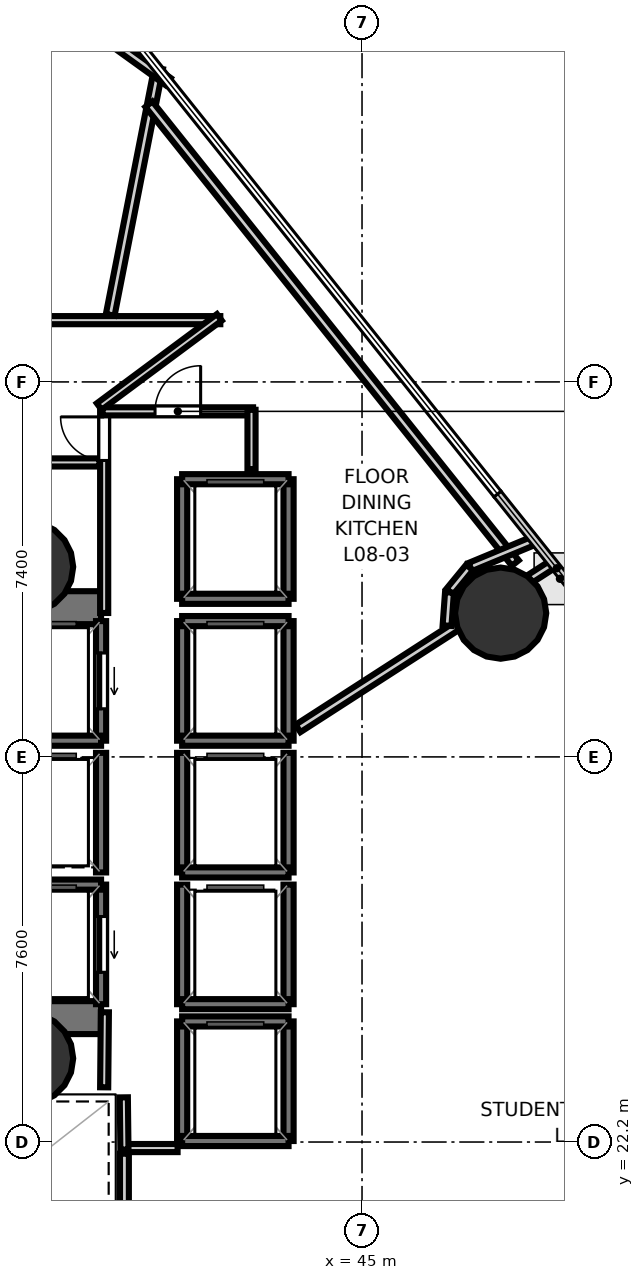
"""IFC4 building model, lengths in metres.
Left out: names, types, materials, properties, quantities, classifications, styles, units other than length and angle.
Written with IfcOpenShell. Run it as: python <this file> out.ifc"""

import sys

from ifc_helpers import new_model, si_unit, direction, frame, frame_2d, origin, origin_2d, place, context, subcontext, project, spatial, rectangle, hollow_circle, extrude, element, fill, save


model = new_model("IFC4")
c1 = context("Model", 3, precision=1e-05, world=origin(), true_north=direction((0.0, 1.0)))
c2 = subcontext(c1, "Body", "Model", "MODEL_VIEW")
j1 = project(units=[si_unit("LENGTHUNIT", "METRE"), si_unit("PLANEANGLEUNIT", "RADIAN")], contexts=[c1])
p1 = place(None, origin())
s1 = spatial("IfcSite", under=j1, at=p1, CompositionType="ELEMENT")
p2 = place(p1, origin())
s2 = spatial("IfcBuilding", under=s1, at=p2, CompositionType="ELEMENT")
p3 = place(p2, frame((0.0, 0.0, 36.8)))
s3 = spatial("IfcBuildingStorey", under=s2, at=p3, CompositionType="ELEMENT", Elevation=36.8)
p4 = place(p3, frame((29.13, 32.745, 0.0), z_axis=(0.0, 0.0, 1.0), x_axis=(1.0, 0.0, 0.0)))
e1 = element("IfcWall", 1, at=p4, inside=s3, PredefinedType="SHEAR", context=c2, shape_type="SweptSolid", body=[
    extrude(rectangle(XDim=10.72, YDim=0.65, at=frame_2d((5.36, 0.0))), origin(), (0.0, 0.0, 1.0), 3.52),
])
p5 = place(p4, frame((1.095, 0.0, 0.0)))
e2 = element("IfcOpeningElement", 2, at=p5, cuts=e1, PredefinedType="OPENING", context=c2, shape_type="SweptSolid", body=[
    extrude(rectangle(XDim=1.25, YDim=2.15, at=frame_2d((0.625, 1.075))), frame((0.0, 0.335, 0.0), z_axis=(0.0, -1.0, 0.0), x_axis=(1.0, 0.0, 0.0)), (0.0, 0.0, 1.0), 0.67),
])
p6 = place(p3, frame((29.13, 24.655, 0.0), z_axis=(0.0, 0.0, 1.0), x_axis=(1.0, 0.0, 0.0)))
e3 = element("IfcWall", 3, at=p6, inside=s3, PredefinedType="SHEAR", context=c2, shape_type="SweptSolid", body=[
    extrude(rectangle(XDim=10.72, YDim=0.65, at=frame_2d((5.36, 0.0))), origin(), (0.0, 0.0, 1.0), 3.52),
])
p7 = place(p6, frame((0.895, 0.0, 0.0)))
e4 = element("IfcOpeningElement", 4, at=p7, cuts=e3, PredefinedType="OPENING", context=c2, shape_type="SweptSolid", body=[
    extrude(rectangle(XDim=1.25, YDim=2.15, at=frame_2d((0.625, 1.075))), frame((0.0, 0.335, 0.0), z_axis=(0.0, -1.0, 0.0), x_axis=(1.0, 0.0, 0.0)), (0.0, 0.0, 1.0), 0.67),
])
for number, where, z_axis, x_axis in (
    (5, (38.4, 33.55, 0.0), (0.0, 0.0, 1.0), (1.0, 0.0, 0.0)),
    (6, (38.4, 23.85, 0.0), (0.0, 0.0, 1.0), (1.0, 0.0, 0.0)),
    (7, (47.736, 32.637, 0.0), (0.0, 0.0, 1.0), (1.0, 0.0, 0.0)),
):
    element("IfcColumn", number, at=place(p3, frame(where, z_axis=z_axis, x_axis=x_axis)), inside=s3, PredefinedType="COLUMN", context=c2, shape_type="SweptSolid", body=[
        extrude(hollow_circle(Radius=0.9, WallThickness=0.045, at=origin_2d()), origin(), (0.0, 0.0, 1.0), 3.7),
    ])
p8 = place(p3, frame((40.147, 44.413, 0.0), z_axis=(0.0, 0.0, 1.0), x_axis=(-0.997124396063, -0.07578217981, 0.0)))
e8 = element("IfcWall", 8, at=p8, inside=s3, PredefinedType="SOLIDWALL", context=c2, shape_type="SweptSolid", body=[
    extrude(rectangle(XDim=13.457, YDim=0.28, at=frame_2d((6.728, 0.0))), origin(), (0.0, 0.0, 1.0), 3.52),
])
p9 = place(p8, frame((3.137, 0.0, 0.85)))
e9 = element("IfcOpeningElement", 9, at=p9, cuts=e8, PredefinedType="OPENING", context=c2, shape_type="SweptSolid", body=[
    extrude(rectangle(XDim=1.8, YDim=2.1, at=frame_2d((0.9, 1.05))), frame((0.0, 0.15, 0.0), z_axis=(0.0, -1.0, 0.0), x_axis=(1.0, 0.0, 0.0)), (0.0, 0.0, 1.0), 0.3),
])
p10 = place(p8, frame((7.56, 0.0, 0.85)))
e10 = element("IfcOpeningElement", 10, at=p10, cuts=e8, PredefinedType="OPENING", context=c2, shape_type="SweptSolid", body=[
    extrude(rectangle(XDim=1.8, YDim=2.1, at=frame_2d((0.9, 1.05))), frame((0.0, 0.15, 0.0), z_axis=(0.0, -1.0, 0.0), x_axis=(1.0, 0.0, 0.0)), (0.0, 0.0, 1.0), 0.3),
])
p11 = place(p3, frame((39.85, 30.12, 0.0), z_axis=(0.0, 0.0, 1.0), x_axis=(0.0, 1.0, 0.0)))
e11 = element("IfcWall", 11, at=p11, inside=s3, PredefinedType="SOLIDWALL", context=c2, shape_type="SweptSolid", body=[
    extrude(rectangle(XDim=2.36, YDim=0.2, at=frame_2d((1.18, 0.0))), origin(), (0.0, 0.0, 1.0), 3.52),
])
p12 = place(p11, frame((0.63, 0.0, 0.0)))
e12 = element("IfcOpeningElement", 12, at=p12, cuts=e11, PredefinedType="OPENING", context=c2, shape_type="SweptSolid", body=[
    extrude(rectangle(XDim=1.1, YDim=2.15, at=frame_2d((0.55, 1.075))), frame((0.0, 0.11, 0.0), z_axis=(0.0, -1.0, 0.0), x_axis=(1.0, 0.0, 0.0)), (0.0, 0.0, 1.0), 0.22),
])
p13 = place(p3, frame((37.75, 30.12, 0.0), z_axis=(0.0, 0.0, 1.0), x_axis=(1.0, 0.0, 0.0)))
e13 = element("IfcWall", 13, at=p13, inside=s3, PredefinedType="SOLIDWALL", context=c2, shape_type="SweptSolid", body=[
    extrude(rectangle(XDim=2.1, YDim=0.2, at=frame_2d((1.05, 0.0))), origin(), (0.0, 0.0, 1.0), 3.52),
])
p14 = place(p3, frame((39.85, 24.92, 0.0), z_axis=(0.0, 0.0, 1.0), x_axis=(0.0, 1.0, 0.0)))
e14 = element("IfcWall", 14, at=p14, inside=s3, PredefinedType="SOLIDWALL", context=c2, shape_type="SweptSolid", body=[
    extrude(rectangle(XDim=2.36, YDim=0.2, at=frame_2d((1.18, 0.0))), origin(), (0.0, 0.0, 1.0), 3.52),
])
p15 = place(p14, frame((0.63, 0.0, 0.0)))
e15 = element("IfcOpeningElement", 15, at=p15, cuts=e14, PredefinedType="OPENING", context=c2, shape_type="SweptSolid", body=[
    extrude(rectangle(XDim=1.1, YDim=2.15, at=frame_2d((0.55, 1.075))), frame((0.0, 0.11, 0.0), z_axis=(0.0, -1.0, 0.0), x_axis=(1.0, 0.0, 0.0)), (0.0, 0.0, 1.0), 0.22),
])
p16 = place(p3, frame((37.75, 27.28, 0.0), z_axis=(0.0, 0.0, 1.0), x_axis=(1.0, 0.0, 0.0)))
e16 = element("IfcWall", 16, at=p16, inside=s3, PredefinedType="SOLIDWALL", context=c2, shape_type="SweptSolid", body=[
    extrude(rectangle(XDim=2.1, YDim=0.2, at=frame_2d((1.05, 0.0))), origin(), (0.0, 0.0, 1.0), 3.52),
])
for number, where, z_axis, x_axis in (
    (17, (43.55, 30.12, 0.0), (0.0, 0.0, 1.0), (0.0, 1.0, 0.0)),
    (18, (41.45, 30.12, 0.0), (0.0, 0.0, 1.0), (0.0, 1.0, 0.0)),
):
    element("IfcWall", number, at=place(p3, frame(where, z_axis=z_axis, x_axis=x_axis)), inside=s3, PredefinedType="SOLIDWALL", context=c2, shape_type="SweptSolid", body=[
        extrude(rectangle(XDim=2.36, YDim=0.2, at=frame_2d((1.18, 0.0))), origin(), (0.0, 0.0, 1.0), 3.52),
    ])
for number, where, z_axis, x_axis in (
    (19, (41.45, 32.48, 0.0), (0.0, 0.0, 1.0), (1.0, 0.0, 0.0)),
    (20, (41.45, 30.12, 0.0), (0.0, 0.0, 1.0), (1.0, 0.0, 0.0)),
):
    element("IfcWall", number, at=place(p3, frame(where, z_axis=z_axis, x_axis=x_axis)), inside=s3, PredefinedType="SOLIDWALL", context=c2, shape_type="SweptSolid", body=[
        extrude(rectangle(XDim=2.1, YDim=0.2, at=frame_2d((1.05, 0.0))), origin(), (0.0, 0.0, 1.0), 3.52),
    ])
for number, where, z_axis, x_axis in (
    (21, (43.55, 27.52, 0.0), (0.0, 0.0, 1.0), (0.0, 1.0, 0.0)),
    (22, (41.45, 27.52, 0.0), (0.0, 0.0, 1.0), (0.0, 1.0, 0.0)),
):
    element("IfcWall", number, at=place(p3, frame(where, z_axis=z_axis, x_axis=x_axis)), inside=s3, PredefinedType="SOLIDWALL", context=c2, shape_type="SweptSolid", body=[
        extrude(rectangle(XDim=2.36, YDim=0.2, at=frame_2d((1.18, 0.0))), origin(), (0.0, 0.0, 1.0), 3.52),
    ])
p17 = place(p3, frame((41.45, 27.52, 0.0), z_axis=(0.0, 0.0, 1.0), x_axis=(1.0, 0.0, 0.0)))
e23 = element("IfcWall", 23, at=p17, inside=s3, PredefinedType="SOLIDWALL", context=c2, shape_type="SweptSolid", body=[
    extrude(rectangle(XDim=2.1, YDim=0.2, at=frame_2d((1.05, 0.0))), origin(), (0.0, 0.0, 1.0), 3.52),
])
for number, where, z_axis, x_axis in (
    (24, (43.55, 24.92, 0.0), (0.0, 0.0, 1.0), (0.0, 1.0, 0.0)),
    (25, (41.45, 24.92, 0.0), (0.0, 0.0, 1.0), (0.0, 1.0, 0.0)),
):
    element("IfcWall", number, at=place(p3, frame(where, z_axis=z_axis, x_axis=x_axis)), inside=s3, PredefinedType="SOLIDWALL", context=c2, shape_type="SweptSolid", body=[
        extrude(rectangle(XDim=2.36, YDim=0.2, at=frame_2d((1.18, 0.0))), origin(), (0.0, 0.0, 1.0), 3.52),
    ])
p18 = place(p3, frame((41.45, 24.92, 0.0), z_axis=(0.0, 0.0, 1.0), x_axis=(1.0, 0.0, 0.0)))
e26 = element("IfcWall", 26, at=p18, inside=s3, PredefinedType="SOLIDWALL", context=c2, shape_type="SweptSolid", body=[
    extrude(rectangle(XDim=2.1, YDim=0.2, at=frame_2d((1.05, 0.0))), origin(), (0.0, 0.0, 1.0), 3.52),
])
p19 = place(p3, frame((39.85, 27.52, 0.0), z_axis=(0.0, 0.0, 1.0), x_axis=(0.0, 1.0, 0.0)))
e27 = element("IfcWall", 27, at=p19, inside=s3, PredefinedType="SOLIDWALL", context=c2, shape_type="SweptSolid", body=[
    extrude(rectangle(XDim=2.36, YDim=0.2, at=frame_2d((1.18, 0.0))), origin(), (0.0, 0.0, 1.0), 3.52),
])
for number, where, z_axis, x_axis in (
    (28, (43.55, 22.22, 0.0), (0.0, 0.0, 1.0), (0.0, 1.0, 0.0)),
    (29, (41.45, 22.22, 0.0), (0.0, 0.0, 1.0), (0.0, 1.0, 0.0)),
):
    element("IfcWall", number, at=place(p3, frame(where, z_axis=z_axis, x_axis=x_axis)), inside=s3, PredefinedType="SOLIDWALL", context=c2, shape_type="SweptSolid", body=[
        extrude(rectangle(XDim=2.36, YDim=0.2, at=frame_2d((1.18, 0.0))), origin(), (0.0, 0.0, 1.0), 3.52),
    ])
for number, where, z_axis, x_axis in (
    (30, (41.45, 24.58, 0.0), (0.0, 0.0, 1.0), (1.0, 0.0, 0.0)),
    (31, (41.45, 22.22, 0.0), (0.0, 0.0, 1.0), (1.0, 0.0, 0.0)),
):
    element("IfcWall", number, at=place(p3, frame(where, z_axis=z_axis, x_axis=x_axis)), inside=s3, PredefinedType="SOLIDWALL", context=c2, shape_type="SweptSolid", body=[
        extrude(rectangle(XDim=2.1, YDim=0.2, at=frame_2d((1.05, 0.0))), origin(), (0.0, 0.0, 1.0), 3.52),
    ])
for number, where, z_axis, x_axis in (
    (32, (43.55, 32.92, 0.0), (0.0, 0.0, 1.0), (0.0, 1.0, 0.0)),
    (33, (41.45, 32.92, 0.0), (0.0, 0.0, 1.0), (0.0, 1.0, 0.0)),
):
    element("IfcWall", number, at=place(p3, frame(where, z_axis=z_axis, x_axis=x_axis)), inside=s3, PredefinedType="SOLIDWALL", context=c2, shape_type="SweptSolid", body=[
        extrude(rectangle(XDim=2.36, YDim=0.2, at=frame_2d((1.18, 0.0))), origin(), (0.0, 0.0, 1.0), 3.52),
    ])
for number, where, z_axis, x_axis in (
    (34, (41.45, 35.28, 0.0), (0.0, 0.0, 1.0), (1.0, 0.0, 0.0)),
    (35, (41.45, 32.92, 0.0), (0.0, 0.0, 1.0), (1.0, 0.0, 0.0)),
):
    element("IfcWall", number, at=place(p3, frame(where, z_axis=z_axis, x_axis=x_axis)), inside=s3, PredefinedType="SOLIDWALL", context=c2, shape_type="SweptSolid", body=[
        extrude(rectangle(XDim=2.1, YDim=0.2, at=frame_2d((1.05, 0.0))), origin(), (0.0, 0.0, 1.0), 3.52),
    ])
p20 = place(p3, frame((39.911, 32.64, 0.0), z_axis=(0.0, 0.0, 1.0), x_axis=(0.0, 1.0, 0.0)))
e36 = element("IfcWall", 36, at=p20, inside=s3, PredefinedType="PARTITIONING", context=c2, shape_type="SweptSolid", body=[
    extrude(rectangle(XDim=4.01, YDim=0.16, at=frame_2d((2.005, 0.0))), origin(), (0.0, 0.0, 1.0), 2.84),
])
p21 = place(p20, frame((3.01, 0.0, 0.0)))
e37 = element("IfcOpeningElement", 37, at=p21, cuts=e36, PredefinedType="OPENING", context=c2, shape_type="SweptSolid", body=[
    extrude(rectangle(XDim=0.86, YDim=2.05, at=frame_2d((0.43, 1.025))), frame((0.0, 0.09, 0.0), z_axis=(0.0, -1.0, 0.0), x_axis=(1.0, 0.0, 0.0)), (0.0, 0.0, 1.0), 0.18),
])
p22 = place(p3, frame((39.88, 36.619, 0.0), z_axis=(0.0, 0.0, 1.0), x_axis=(1.0, 0.0, 0.0)))
e38 = element("IfcWall", 38, at=p22, inside=s3, PredefinedType="PARTITIONING", context=c2, shape_type="SweptSolid", body=[
    extrude(rectangle(XDim=2.97, YDim=0.16, at=frame_2d((1.485, 0.0))), origin(), (0.0, 0.0, 1.0), 2.84),
])
p23 = place(p22, frame((1.035, 0.0, 0.0)))
e39 = element("IfcOpeningElement", 39, at=p23, cuts=e38, PredefinedType="OPENING", context=c2, shape_type="SweptSolid", body=[
    extrude(rectangle(XDim=0.9, YDim=2.1, at=frame_2d((0.45, 1.05))), frame((0.0, 0.09, 0.0), z_axis=(0.0, -1.0, 0.0), x_axis=(1.0, 0.0, 0.0)), (0.0, 0.0, 1.0), 0.18),
])
p24 = place(p3, frame((42.819, 36.65, 0.0), z_axis=(0.0, 0.0, 1.0), x_axis=(0.0, -1.0, 0.0)))
e40 = element("IfcWall", 40, at=p24, inside=s3, PredefinedType="PARTITIONING", context=c2, shape_type="SweptSolid", body=[
    extrude(rectangle(XDim=1.17, YDim=0.16, at=frame_2d((0.585, 0.0))), origin(), (0.0, 0.0, 1.0), 2.84),
])
p25 = place(p3, frame((41.36, 22.081, 0.0), z_axis=(0.0, 0.0, 1.0), x_axis=(-1.0, 0.0, 0.0)))
e41 = element("IfcWall", 41, at=p25, inside=s3, PredefinedType="PARTITIONING", context=c2, shape_type="SweptSolid", body=[
    extrude(rectangle(XDim=1.08, YDim=0.16, at=frame_2d((0.54, 0.0))), origin(), (0.0, 0.0, 1.0), 2.84),
])
p26 = place(p3, frame((40.311, 22.05, 0.0), z_axis=(0.0, 0.0, 1.0), x_axis=(-0.011836292006, 0.999929948642, 0.0)))
e42 = element("IfcWall", 42, at=p26, inside=s3, PredefinedType="PARTITIONING", context=c2, shape_type="SweptSolid", body=[
    extrude(rectangle(XDim=1.031, YDim=0.16, at=frame_2d((0.516, 0.0))), origin(), (0.0, 0.0, 1.0), 2.84),
])
p27 = place(p3, frame((39.911, 23.28, 0.0), z_axis=(0.0, 0.0, 1.0), x_axis=(0.009397771291, 0.999955839972, 0.0)))
e43 = element("IfcWall", 43, at=p27, inside=s3, PredefinedType="PARTITIONING", context=c2, shape_type="SweptSolid", body=[
    extrude(rectangle(XDim=1.481, YDim=0.16, at=frame_2d((0.74, 0.0))), origin(), (0.0, 0.0, 1.0), 2.84),
])
p28 = place(p3, frame((26.42, 38.419, 0.0), z_axis=(0.0, 0.0, 1.0), x_axis=(1.0, 0.0, 0.0)))
e44 = element("IfcWall", 44, at=p28, inside=s3, PredefinedType="PARTITIONING", context=c2, shape_type="SweptSolid", body=[
    extrude(rectangle(XDim=15.783, YDim=0.16, at=frame_2d((7.892, 0.0))), origin(), (0.0, 0.0, 1.0), 2.798),
])
p29 = place(p28, frame((9.246, 0.0, 0.0)))
e45 = element("IfcOpeningElement", 45, at=p29, cuts=e44, PredefinedType="OPENING", context=c2, shape_type="SweptSolid", body=[
    extrude(rectangle(XDim=0.9, YDim=2.1, at=frame_2d((0.45, 1.05))), frame((0.0, 0.09, 0.0), z_axis=(0.0, -1.0, 0.0), x_axis=(1.0, 0.0, 0.0)), (0.0, 0.0, 1.0), 0.18),
])
p30 = place(p28, frame((2.836, 0.0, 0.0)))
e46 = element("IfcOpeningElement", 46, at=p30, cuts=e44, PredefinedType="OPENING", context=c2, shape_type="SweptSolid", body=[
    extrude(rectangle(XDim=0.9, YDim=2.1, at=frame_2d((0.45, 1.05))), frame((0.0, 0.09, 0.0), z_axis=(0.0, -1.0, 0.0), x_axis=(1.0, 0.0, 0.0)), (0.0, 0.0, 1.0), 0.18),
])
p31 = place(p3, frame((42.185, 38.475, 0.0), z_axis=(0.0, 0.0, 1.0), x_axis=(-0.802818467394, -0.596223538961, 0.0)))
e47 = element("IfcWall", 47, at=p31, inside=s3, PredefinedType="PARTITIONING", context=c2, shape_type="SweptSolid", body=[
    extrude(rectangle(XDim=2.953, YDim=0.16, at=frame_2d((1.477, 0.0))), origin(), (0.0, 0.0, 1.0), 2.798),
])
p32 = place(p3, frame((39.818, 35.611, 0.0), z_axis=(0.0, 0.0, 1.0), x_axis=(-1.0, 0.0, 0.0)))
e48 = element("IfcWall", 48, at=p32, inside=s3, PredefinedType="PARTITIONING", context=c2, shape_type="SweptSolid", body=[
    extrude(rectangle(XDim=2.768, YDim=0.16, at=frame_2d((1.384, 0.0))), origin(), (0.0, 0.0, 1.0), 2.84),
])
p33 = place(p3, frame((40.311, 18.0, 0.0), z_axis=(0.0, 0.0, 1.0), x_axis=(0.0, 1.0, 0.0)))
e49 = element("IfcWall", 49, at=p33, inside=s3, PredefinedType="PLUMBINGWALL", context=c2, shape_type="SweptSolid", body=[
    extrude(rectangle(XDim=3.97, YDim=0.175, at=frame_2d((1.985, 0.0))), origin(), (0.0, 0.0, 1.0), 2.84),
])
p34 = place(p3, frame((43.737, 30.362, 0.0), z_axis=(0.0, 0.0, 1.0), x_axis=(0.840502421902, 0.541807787667, 0.0)))
e50 = element("IfcWall", 50, at=p34, inside=s3, PredefinedType="PLUMBINGWALL", context=c2, shape_type="SweptSolid", body=[
    extrude(rectangle(XDim=6.013, YDim=0.175, at=frame_2d((3.007, 0.0))), origin(), (0.0, 0.0, 1.0), 2.095),
])
p35 = place(p3, frame((40.031, 38.524, 0.0), z_axis=(0.0, 0.0, 1.0), x_axis=(0.192440494931, 0.981308644571, 0.0)))
e51 = element("IfcWall", 51, at=p35, inside=s3, PredefinedType="PLUMBINGWALL", context=c2, shape_type="SweptSolid", body=[
    extrude(rectangle(XDim=4.958, YDim=0.175, at=frame_2d((2.479, 0.0))), origin(), (0.0, 0.0, 1.0), 2.798),
])
p36 = place(p3, frame((40.794, 42.681, 0.0), z_axis=(0.0, 0.0, 1.0), x_axis=(0.623977950445, -0.781441947529, 0.0)))
e52 = element("IfcWall", 52, at=p36, inside=s3, PredefinedType="PLUMBINGWALL", context=c2, shape_type="SweptSolid", body=[
    extrude(rectangle(XDim=11.588, YDim=0.175, at=frame_2d((5.794, 0.0))), origin(), (0.0, 0.0, 1.0), 2.095),
])
p37 = place(p3, frame((48.423, 34.08, 0.0), z_axis=(0.0, 0.0, 1.0), x_axis=(-0.923888707417, -0.382661281433, 0.0)))
e53 = element("IfcWall", 53, at=p37, inside=s3, PredefinedType="PLUMBINGWALL", context=c2, shape_type="SweptSolid", body=[
    extrude(rectangle(XDim=1.393, YDim=0.175, at=frame_2d((0.697, 0.0))), origin(), (0.0, 0.0, 1.0), 2.095),
])
p38 = place(p3, frame((47.123, 33.538, 0.0), z_axis=(0.0, 0.0, 1.0), x_axis=(-0.634274060347, -0.773108282436, 0.0)))
e54 = element("IfcWall", 54, at=p38, inside=s3, PredefinedType="PLUMBINGWALL", context=c2, shape_type="SweptSolid", body=[
    extrude(rectangle(XDim=0.615, YDim=0.175, at=frame_2d((0.308, 0.0))), origin(), (0.0, 0.0, 1.0), 2.798),
])
p39 = place(p3, frame((46.726, 33.045, 0.0), z_axis=(0.0, 0.0, 1.0), x_axis=(-0.072993708231, -0.997332401238, 0.0)))
e55 = element("IfcWall", 55, at=p39, inside=s3, PredefinedType="PLUMBINGWALL", context=c2, shape_type="SweptSolid", body=[
    extrude(rectangle(XDim=0.656, YDim=0.175, at=frame_2d((0.328, 0.0))), origin(), (0.0, 0.0, 1.0), 2.84),
])
p40 = place(p3, frame((39.44, 44.376, 0.0), z_axis=(0.0, 0.0, 1.0), x_axis=(0.81138921051, -0.584506243822, 0.0)))
e56 = element("IfcWall", 56, at=p40, inside=s3, PredefinedType="PLUMBINGWALL", context=c2, shape_type="SweptSolid", body=[
    extrude(rectangle(XDim=2.138, YDim=0.175, at=frame_2d((1.069, 0.0))), origin(), (0.0, 0.0, 1.0), 2.84),
])
p41 = place(p12, origin())
e57 = element("IfcDoor", 57, at=p41, inside=s3, OperationType="SLIDING_TO_LEFT", PredefinedType="DOOR", context=c2, shape_type="SweptSolid", body=[
    extrude(rectangle(XDim=1.1, YDim=2.15, at=frame_2d((0.55, 1.075))), frame((0.0, 0.025, 0.0), z_axis=(0.0, -1.0, 0.0), x_axis=(1.0, 0.0, 0.0)), (0.0, 0.0, 1.0), 0.05),
])
fill(e12, e57)
p42 = place(p15, origin())
e58 = element("IfcDoor", 58, at=p42, inside=s3, OperationType="SLIDING_TO_LEFT", PredefinedType="DOOR", context=c2, shape_type="SweptSolid", body=[
    extrude(rectangle(XDim=1.1, YDim=2.15, at=frame_2d((0.55, 1.075))), frame((0.0, 0.025, 0.0), z_axis=(0.0, -1.0, 0.0), x_axis=(1.0, 0.0, 0.0)), (0.0, 0.0, 1.0), 0.05),
])
fill(e15, e58)
p43 = place(p21, origin())
e59 = element("IfcDoor", 59, at=p43, inside=s3, OperationType="SINGLE_SWING_RIGHT", PredefinedType="DOOR", context=c2, shape_type="SweptSolid", body=[
    extrude(rectangle(XDim=0.86, YDim=2.05, at=frame_2d((0.43, 1.025))), frame((0.0, 0.025, 0.0), z_axis=(0.0, -1.0, 0.0), x_axis=(1.0, 0.0, 0.0)), (0.0, 0.0, 1.0), 0.05),
])
fill(e37, e59)
p44 = place(p23, origin())
e60 = element("IfcDoor", 60, at=p44, inside=s3, OperationType="SINGLE_SWING_RIGHT", PredefinedType="DOOR", context=c2, shape_type="SweptSolid", body=[
    extrude(rectangle(XDim=0.9, YDim=2.1, at=frame_2d((0.45, 1.05))), frame((0.0, 0.025, 0.0), z_axis=(0.0, -1.0, 0.0), x_axis=(1.0, 0.0, 0.0)), (0.0, 0.0, 1.0), 0.05),
])
fill(e39, e60)
save(model, sys.argv[1])
